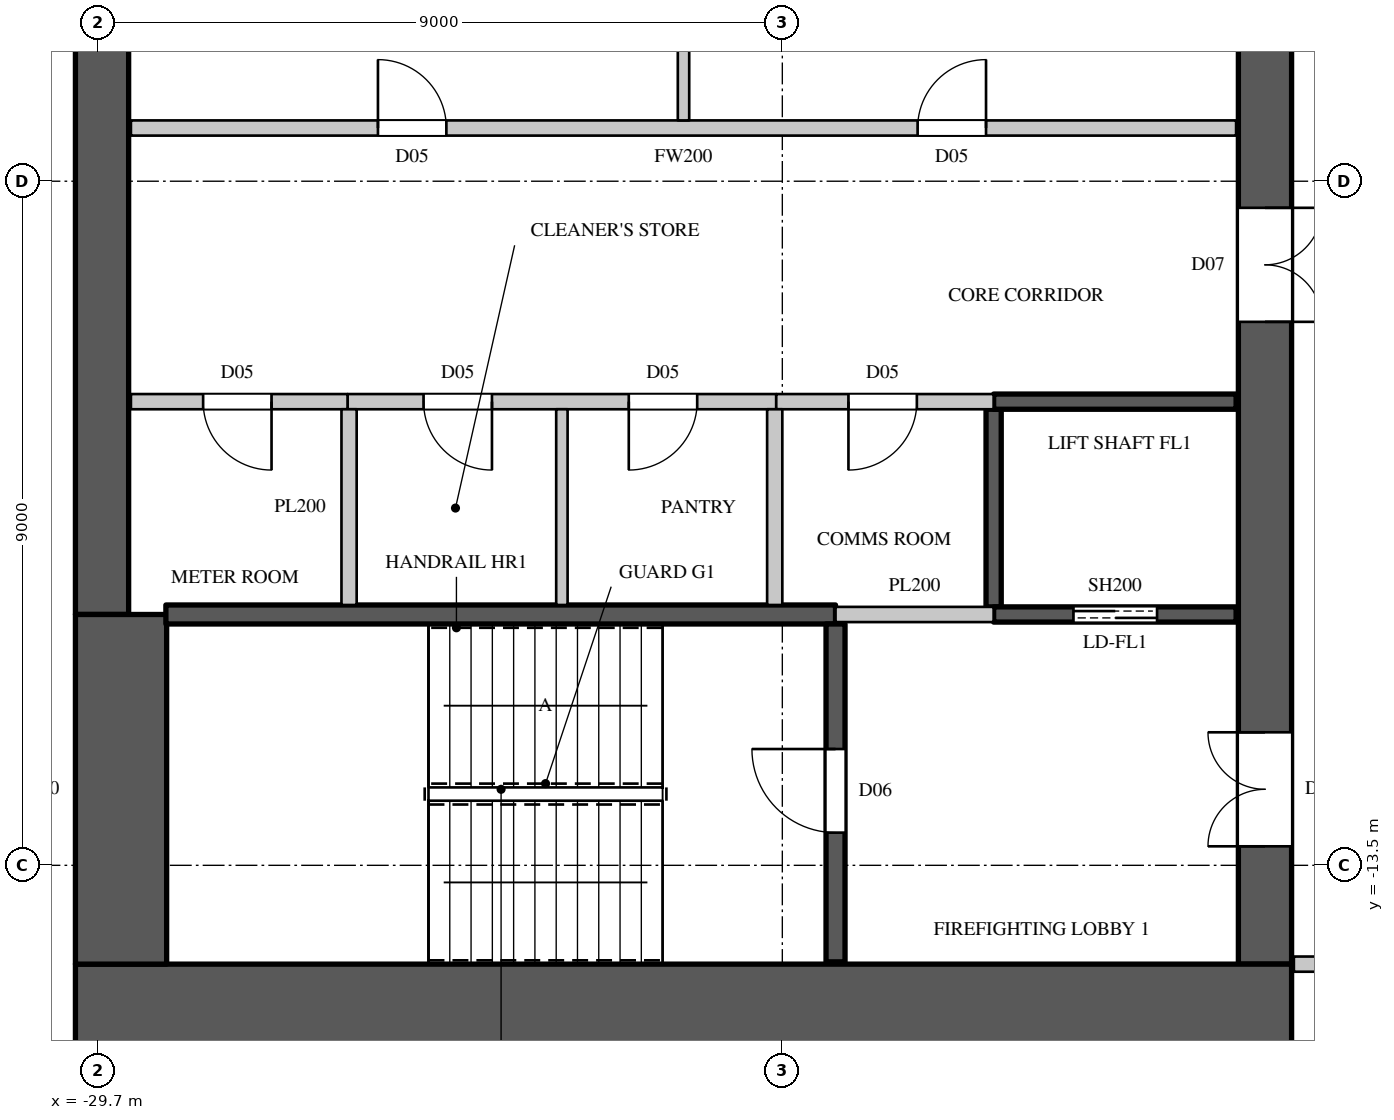
"""IFC4 building model, lengths in metres.
Left out: names, types, materials, properties, quantities, classifications, styles, units other than length and angle.
Written with IfcOpenShell. Run it as: python <this file> out.ifc"""

import sys

from ifc_helpers import new_model, si_unit, direction, frame, frame_2d, origin, place, context, subcontext, project, spatial, rectangle, extrude, element, fill, save


model = new_model("IFC4")
c1 = context("Model", 3, precision=1e-05, world=origin(), true_north=direction((0.0, 1.0)))
c2 = subcontext(c1, "Body", "Model", "MODEL_VIEW")
j1 = project(units=[si_unit("LENGTHUNIT", "METRE"), si_unit("PLANEANGLEUNIT", "RADIAN")], contexts=[c1])
p1 = place(None, origin())
s1 = spatial("IfcSite", under=j1, at=p1, CompositionType="ELEMENT")
p2 = place(p1, origin())
s2 = spatial("IfcBuilding", under=s1, at=p2, CompositionType="ELEMENT")
p3 = place(p2, frame((0.0, 0.0, 300.8)))
s3 = spatial("IfcBuildingStorey", under=s2, at=p3, CompositionType="ELEMENT", Elevation=300.8)
p4 = place(p3, frame((-30.0, -15.4, 0.0), z_axis=(0.0, 0.0, 1.0), x_axis=(1.0, 0.0, 0.0)))
e1 = element("IfcWall", 1, at=p4, inside=s3, PredefinedType="SHEAR", context=c2, shape_type="SweptSolid", body=[
    extrude(rectangle(XDim=16.0, YDim=1.2, at=frame_2d((8.0, 0.0))), origin(), (0.0, 0.0, 1.0), 4.1),
])
p5 = place(p3, frame((-14.35, -14.8, 0.0), z_axis=(0.0, 0.0, 1.0), x_axis=(0.0, 1.0, 0.0)))
e2 = element("IfcWall", 2, at=p5, inside=s3, PredefinedType="SHEAR", context=c2, shape_type="SweptSolid", body=[
    extrude(rectangle(XDim=29.6, YDim=0.7, at=frame_2d((14.8, 0.0))), origin(), (0.0, 0.0, 1.0), 4.1),
])
p6 = place(p5, frame((1.55, 0.0, 0.0)))
e3 = element("IfcOpeningElement", 3, at=p6, cuts=e2, PredefinedType="OPENING", context=c2, shape_type="SweptSolid", body=[
    extrude(rectangle(XDim=1.5, YDim=2.4, at=frame_2d((0.75, 1.2))), frame((0.0, 0.36, 0.0), z_axis=(0.0, -1.0, 0.0), x_axis=(1.0, 0.0, 0.0)), (0.0, 0.0, 1.0), 0.72),
])
p7 = place(p5, frame((26.55, 0.0, 0.0)))
e4 = element("IfcOpeningElement", 4, at=p7, cuts=e2, PredefinedType="OPENING", context=c2, shape_type="SweptSolid", body=[
    extrude(rectangle(XDim=1.5, YDim=2.4, at=frame_2d((0.75, 1.2))), frame((0.0, 0.36, 0.0), z_axis=(0.0, -1.0, 0.0), x_axis=(1.0, 0.0, 0.0)), (0.0, 0.0, 1.0), 0.72),
])
p8 = place(p5, frame((8.45, 0.0, 0.0)))
e5 = element("IfcOpeningElement", 5, at=p8, cuts=e2, PredefinedType="OPENING", context=c2, shape_type="SweptSolid", body=[
    extrude(rectangle(XDim=1.5, YDim=2.4, at=frame_2d((0.75, 1.2))), frame((0.0, 0.36, 0.0), z_axis=(0.0, -1.0, 0.0), x_axis=(1.0, 0.0, 0.0)), (0.0, 0.0, 1.0), 0.72),
])
p9 = place(p5, frame((19.65, 0.0, 0.0)))
e6 = element("IfcOpeningElement", 6, at=p9, cuts=e2, PredefinedType="OPENING", context=c2, shape_type="SweptSolid", body=[
    extrude(rectangle(XDim=1.5, YDim=2.4, at=frame_2d((0.75, 1.2))), frame((0.0, 0.36, 0.0), z_axis=(0.0, -1.0, 0.0), x_axis=(1.0, 0.0, 0.0)), (0.0, 0.0, 1.0), 0.72),
])
p10 = place(p5, frame((14.5, 0.0, 0.0)))
e7 = element("IfcOpeningElement", 7, at=p10, cuts=e2, PredefinedType="OPENING", context=c2, shape_type="SweptSolid", body=[
    extrude(rectangle(XDim=0.6, YDim=2.0, at=frame_2d((0.3, 1.0))), frame((0.0, 0.36, 0.0), z_axis=(0.0, -1.0, 0.0), x_axis=(1.0, 0.0, 0.0)), (0.0, 0.0, 1.0), 0.72),
])
p11 = place(p3, frame((-29.65, -10.2, 0.0), z_axis=(0.0, 0.0, 1.0), x_axis=(0.0, 1.0, 0.0)))
e8 = element("IfcWall", 8, at=p11, inside=s3, PredefinedType="SHEAR", context=c2, shape_type="SweptSolid", body=[
    extrude(rectangle(XDim=20.4, YDim=0.7, at=frame_2d((10.2, 0.0))), origin(), (0.0, 0.0, 1.0), 4.1),
])
p12 = place(p3, frame((-29.4, -14.8, 0.0), z_axis=(0.0, 0.0, 1.0), x_axis=(0.0, 1.0, 0.0)))
e9 = element("IfcWall", 9, at=p12, inside=s3, PredefinedType="SHEAR", context=c2, shape_type="SweptSolid", body=[
    extrude(rectangle(XDim=4.6, YDim=1.2, at=frame_2d((2.3, 0.0))), origin(), (0.0, 0.0, 1.0), 4.1),
])
p13 = place(p3, frame((-29.27, -3.8, 0.0), z_axis=(0.0, 0.0, 1.0), x_axis=(1.0, 0.0, 0.0)))
e10 = element("IfcWall", 10, at=p13, inside=s3, PredefinedType="PARTITIONING", context=c2, shape_type="SweptSolid", body=[
    extrude(rectangle(XDim=14.54, YDim=0.2, at=frame_2d((7.27, 0.0))), origin(), (0.0, 0.0, 1.0), 3.8),
])
p14 = place(p13, frame((3.25, 0.0, 0.0)))
e11 = element("IfcOpeningElement", 11, at=p14, cuts=e10, PredefinedType="OPENING", context=c2, shape_type="SweptSolid", body=[
    extrude(rectangle(XDim=0.9, YDim=2.2, at=frame_2d((0.45, 1.1))), frame((0.0, 0.11, 0.0), z_axis=(0.0, -1.0, 0.0), x_axis=(1.0, 0.0, 0.0)), (0.0, 0.0, 1.0), 0.22),
])
p15 = place(p13, frame((10.35, 0.0, 0.0)))
e12 = element("IfcOpeningElement", 12, at=p15, cuts=e10, PredefinedType="OPENING", context=c2, shape_type="SweptSolid", body=[
    extrude(rectangle(XDim=0.9, YDim=2.2, at=frame_2d((0.45, 1.1))), frame((0.0, 0.11, 0.0), z_axis=(0.0, -1.0, 0.0), x_axis=(1.0, 0.0, 0.0)), (0.0, 0.0, 1.0), 0.22),
])
p16 = place(p3, frame((-26.42, -7.4, 0.0), z_axis=(0.0, 0.0, 1.0), x_axis=(1.0, 0.0, 0.0)))
e13 = element("IfcWall", 13, at=p16, inside=s3, PredefinedType="PARTITIONING", context=c2, shape_type="SweptSolid", body=[
    extrude(rectangle(XDim=5.64, YDim=0.2, at=frame_2d((2.82, 0.0))), origin(), (0.0, 0.0, 1.0), 3.8),
])
p17 = place(p16, frame((1.0, 0.0, 0.0)))
e14 = element("IfcOpeningElement", 14, at=p17, cuts=e13, PredefinedType="OPENING", context=c2, shape_type="SweptSolid", body=[
    extrude(rectangle(XDim=0.9, YDim=2.2, at=frame_2d((0.45, 1.1))), frame((0.0, 0.11, 0.0), z_axis=(0.0, -1.0, 0.0), x_axis=(1.0, 0.0, 0.0)), (0.0, 0.0, 1.0), 0.22),
])
p18 = place(p16, frame((3.7, 0.0, 0.0)))
e15 = element("IfcOpeningElement", 15, at=p18, cuts=e13, PredefinedType="OPENING", context=c2, shape_type="SweptSolid", body=[
    extrude(rectangle(XDim=0.9, YDim=2.2, at=frame_2d((0.45, 1.1))), frame((0.0, 0.11, 0.0), z_axis=(0.0, -1.0, 0.0), x_axis=(1.0, 0.0, 0.0)), (0.0, 0.0, 1.0), 0.22),
])
p19 = place(p3, frame((-13.97, -14.8, 0.0), z_axis=(0.0, 0.0, 1.0), x_axis=(1.0, 0.0, 0.0)))
e16 = element("IfcWall", 16, at=p19, inside=s3, PredefinedType="PARTITIONING", context=c2, shape_type="SweptSolid", body=[
    extrude(rectangle(XDim=2.87, YDim=0.2, at=frame_2d((1.435, 0.0))), origin(), (0.0, 0.0, 1.0), 3.8),
])
p20 = place(p3, frame((-23.6, -10.075, 0.0), z_axis=(0.0, 0.0, 1.0), x_axis=(0.0, 1.0, 0.0)))
e17 = element("IfcWall", 17, at=p20, inside=s3, PredefinedType="PARTITIONING", context=c2, shape_type="SweptSolid", body=[
    extrude(rectangle(XDim=2.575, YDim=0.15, at=frame_2d((1.288, 0.0))), origin(), (0.0, 0.0, 1.0), 3.8),
])
p21 = place(p3, frame((-22.0, -3.7, 0.0), z_axis=(0.0, 0.0, 1.0), x_axis=(0.0, 1.0, 0.0)))
e18 = element("IfcWall", 18, at=p21, inside=s3, PredefinedType="PARTITIONING", context=c2, shape_type="SweptSolid", body=[
    extrude(rectangle(XDim=2.6, YDim=0.15, at=frame_2d((1.3, 0.0))), origin(), (0.0, 0.0, 1.0), 3.8),
])
p22 = place(p3, frame((-29.27, -7.4, 0.0), z_axis=(0.0, 0.0, 1.0), x_axis=(1.0, 0.0, 0.0)))
e19 = element("IfcWall", 19, at=p22, inside=s3, PredefinedType="PARTITIONING", context=c2, shape_type="SweptSolid", body=[
    extrude(rectangle(XDim=2.85, YDim=0.2, at=frame_2d((1.425, 0.0))), origin(), (0.0, 0.0, 1.0), 3.8),
])
p23 = place(p22, frame((0.95, 0.0, 0.0)))
e20 = element("IfcOpeningElement", 20, at=p23, cuts=e19, PredefinedType="OPENING", context=c2, shape_type="SweptSolid", body=[
    extrude(rectangle(XDim=0.9, YDim=2.2, at=frame_2d((0.45, 1.1))), frame((0.0, 0.11, 0.0), z_axis=(0.0, -1.0, 0.0), x_axis=(1.0, 0.0, 0.0)), (0.0, 0.0, 1.0), 0.22),
])
p24 = place(p3, frame((-26.4, -10.075, 0.0), z_axis=(0.0, 0.0, 1.0), x_axis=(0.0, 1.0, 0.0)))
e21 = element("IfcWall", 21, at=p24, inside=s3, PredefinedType="PARTITIONING", context=c2, shape_type="SweptSolid", body=[
    extrude(rectangle(XDim=2.575, YDim=0.2, at=frame_2d((1.288, 0.0))), origin(), (0.0, 0.0, 1.0), 3.8),
])
p25 = place(p3, frame((-20.78, -7.4, 0.0), z_axis=(0.0, 0.0, 1.0), x_axis=(1.0, 0.0, 0.0)))
e22 = element("IfcWall", 22, at=p25, inside=s3, PredefinedType="PARTITIONING", context=c2, shape_type="SweptSolid", body=[
    extrude(rectangle(XDim=2.86, YDim=0.2, at=frame_2d((1.43, 0.0))), origin(), (0.0, 0.0, 1.0), 3.8),
])
p26 = place(p25, frame((0.95, 0.0, 0.0)))
e23 = element("IfcOpeningElement", 23, at=p26, cuts=e22, PredefinedType="OPENING", context=c2, shape_type="SweptSolid", body=[
    extrude(rectangle(XDim=0.9, YDim=2.2, at=frame_2d((0.45, 1.1))), frame((0.0, 0.11, 0.0), z_axis=(0.0, -1.0, 0.0), x_axis=(1.0, 0.0, 0.0)), (0.0, 0.0, 1.0), 0.22),
])
p27 = place(p3, frame((-20.8, -10.075, 0.0), z_axis=(0.0, 0.0, 1.0), x_axis=(0.0, 1.0, 0.0)))
e24 = element("IfcWall", 24, at=p27, inside=s3, PredefinedType="PARTITIONING", context=c2, shape_type="SweptSolid", body=[
    extrude(rectangle(XDim=2.575, YDim=0.2, at=frame_2d((1.288, 0.0))), origin(), (0.0, 0.0, 1.0), 3.8),
])
p28 = place(p3, frame((-20.0, -10.2, 0.0), z_axis=(0.0, 0.0, 1.0), x_axis=(1.0, 0.0, 0.0)))
e25 = element("IfcWall", 25, at=p28, inside=s3, PredefinedType="PARTITIONING", context=c2, shape_type="SweptSolid", body=[
    extrude(rectangle(XDim=2.08, YDim=0.2, at=frame_2d((1.04, 0.0))), origin(), (0.0, 0.0, 1.0), 3.8),
])
p29 = place(p3, frame((-17.92, -10.1, 0.0), z_axis=(0.0, 0.0, 1.0), x_axis=(0.0, 1.0, 0.0)))
e26 = element("IfcWall", 26, at=p29, inside=s3, PredefinedType="SHEAR", context=c2, shape_type="SweptSolid", body=[
    extrude(rectangle(XDim=2.6, YDim=0.2, at=frame_2d((1.3, 0.0))), origin(), (0.0, 0.0, 1.0), 3.8),
])
p30 = place(p3, frame((-17.92, -10.2, 0.0), z_axis=(0.0, 0.0, 1.0), x_axis=(1.0, 0.0, 0.0)))
e27 = element("IfcWall", 27, at=p30, inside=s3, PredefinedType="SHEAR", context=c2, shape_type="SweptSolid", body=[
    extrude(rectangle(XDim=3.19, YDim=0.2, at=frame_2d((1.595, 0.0))), origin(), (0.0, 0.0, 1.0), 3.8),
])
p31 = place(p30, frame((1.05, 0.0, 0.0)))
e28 = element("IfcOpeningElement", 28, at=p31, cuts=e27, PredefinedType="OPENING", context=c2, shape_type="SweptSolid", body=[
    extrude(rectangle(XDim=1.1, YDim=2.2, at=frame_2d((0.55, 1.1))), frame((0.0, 0.11, 0.0), z_axis=(0.0, -1.0, 0.0), x_axis=(1.0, 0.0, 0.0)), (0.0, 0.0, 1.0), 0.22),
])
p32 = place(p3, frame((-17.92, -7.4, 0.0), z_axis=(0.0, 0.0, 1.0), x_axis=(1.0, 0.0, 0.0)))
e29 = element("IfcWall", 29, at=p32, inside=s3, PredefinedType="SHEAR", context=c2, shape_type="SweptSolid", body=[
    extrude(rectangle(XDim=3.19, YDim=0.2, at=frame_2d((1.595, 0.0))), origin(), (0.0, 0.0, 1.0), 3.8),
])
p33 = place(p3, frame((-28.81, -10.2, 0.0), z_axis=(0.0, 0.0, 1.0), x_axis=(1.0, 0.0, 0.0)))
e30 = element("IfcWall", 30, at=p33, inside=s3, PredefinedType="SHEAR", context=c2, shape_type="SweptSolid", body=[
    extrude(rectangle(XDim=8.81, YDim=0.25, at=frame_2d((4.405, 0.0))), origin(), (0.0, 0.0, 1.0), 3.8),
])
p34 = place(p3, frame((-20.0, -14.77, 0.0), z_axis=(0.0, 0.0, 1.0), x_axis=(0.0, 1.0, 0.0)))
e31 = element("IfcWall", 31, at=p34, inside=s3, PredefinedType="SHEAR", context=c2, shape_type="SweptSolid", body=[
    extrude(rectangle(XDim=4.445, YDim=0.25, at=frame_2d((2.223, 0.0))), origin(), (0.0, 0.0, 1.0), 3.8),
])
p35 = place(p34, frame((1.7, 0.0, 0.0)))
e32 = element("IfcOpeningElement", 32, at=p35, cuts=e31, PredefinedType="OPENING", context=c2, shape_type="SweptSolid", body=[
    extrude(rectangle(XDim=1.1, YDim=2.2, at=frame_2d((0.55, 1.1))), frame((0.0, 0.135, 0.0), z_axis=(0.0, -1.0, 0.0), x_axis=(1.0, 0.0, 0.0)), (0.0, 0.0, 1.0), 0.27),
])
p36 = place(p35, origin())
e33 = element("IfcDoor", 33, at=p36, inside=s3, OperationType="SINGLE_SWING_RIGHT", PredefinedType="DOOR", context=c2, shape_type="SweptSolid", body=[
    extrude(rectangle(XDim=1.1, YDim=2.2, at=frame_2d((0.55, 1.1))), frame((0.0, 0.025, 0.0), z_axis=(0.0, -1.0, 0.0), x_axis=(1.0, 0.0, 0.0)), (0.0, 0.0, 1.0), 0.05),
])
fill(e32, e33)
p37 = place(p23, origin())
e34 = element("IfcDoor", 34, at=p37, inside=s3, OperationType="SINGLE_SWING_LEFT", PredefinedType="DOOR", context=c2, shape_type="SweptSolid", body=[
    extrude(rectangle(XDim=0.9, YDim=2.2, at=frame_2d((0.45, 1.1))), frame((0.0, 0.025, 0.0), z_axis=(0.0, -1.0, 0.0), x_axis=(1.0, 0.0, 0.0)), (0.0, 0.0, 1.0), 0.05),
])
fill(e20, e34)
p38 = place(p17, origin())
e35 = element("IfcDoor", 35, at=p38, inside=s3, OperationType="SINGLE_SWING_LEFT", PredefinedType="DOOR", context=c2, shape_type="SweptSolid", body=[
    extrude(rectangle(XDim=0.9, YDim=2.2, at=frame_2d((0.45, 1.1))), frame((0.0, 0.025, 0.0), z_axis=(0.0, -1.0, 0.0), x_axis=(1.0, 0.0, 0.0)), (0.0, 0.0, 1.0), 0.05),
])
fill(e14, e35)
p39 = place(p18, origin())
e36 = element("IfcDoor", 36, at=p39, inside=s3, OperationType="SINGLE_SWING_RIGHT", PredefinedType="DOOR", context=c2, shape_type="SweptSolid", body=[
    extrude(rectangle(XDim=0.9, YDim=2.2, at=frame_2d((0.45, 1.1))), frame((0.0, 0.025, 0.0), z_axis=(0.0, -1.0, 0.0), x_axis=(1.0, 0.0, 0.0)), (0.0, 0.0, 1.0), 0.05),
])
fill(e15, e36)
p40 = place(p26, origin())
e37 = element("IfcDoor", 37, at=p40, inside=s3, OperationType="SINGLE_SWING_RIGHT", PredefinedType="DOOR", context=c2, shape_type="SweptSolid", body=[
    extrude(rectangle(XDim=0.9, YDim=2.2, at=frame_2d((0.45, 1.1))), frame((0.0, 0.025, 0.0), z_axis=(0.0, -1.0, 0.0), x_axis=(1.0, 0.0, 0.0)), (0.0, 0.0, 1.0), 0.05),
])
fill(e23, e37)
p41 = place(p14, origin())
e38 = element("IfcDoor", 38, at=p41, inside=s3, OperationType="SINGLE_SWING_LEFT", PredefinedType="DOOR", context=c2, shape_type="SweptSolid", body=[
    extrude(rectangle(XDim=0.9, YDim=2.2, at=frame_2d((0.45, 1.1))), frame((0.0, 0.025, 0.0), z_axis=(0.0, -1.0, 0.0), x_axis=(1.0, 0.0, 0.0)), (0.0, 0.0, 1.0), 0.05),
])
fill(e11, e38)
p42 = place(p15, origin())
e39 = element("IfcDoor", 39, at=p42, inside=s3, OperationType="SINGLE_SWING_RIGHT", PredefinedType="DOOR", context=c2, shape_type="SweptSolid", body=[
    extrude(rectangle(XDim=0.9, YDim=2.2, at=frame_2d((0.45, 1.1))), frame((0.0, 0.025, 0.0), z_axis=(0.0, -1.0, 0.0), x_axis=(1.0, 0.0, 0.0)), (0.0, 0.0, 1.0), 0.05),
])
fill(e12, e39)
p43 = place(p31, origin())
e40 = element("IfcDoor", 40, at=p43, inside=s3, OperationType="DOUBLE_DOOR_SLIDING", PredefinedType="DOOR", context=c2, shape_type="SweptSolid", body=[
    extrude(rectangle(XDim=1.1, YDim=2.2, at=frame_2d((0.55, 1.1))), frame((0.0, 0.025, 0.0), z_axis=(0.0, -1.0, 0.0), x_axis=(1.0, 0.0, 0.0)), (0.0, 0.0, 1.0), 0.05),
])
fill(e28, e40)
p44 = place(p6, origin())
e41 = element("IfcDoor", 41, at=p44, inside=s3, OperationType="DOUBLE_DOOR_SINGLE_SWING", PredefinedType="DOOR", context=c2, shape_type="SweptSolid", body=[
    extrude(rectangle(XDim=1.5, YDim=2.4, at=frame_2d((0.75, 1.2))), frame((0.0, 0.345, 0.0), z_axis=(0.0, -1.0, 0.0), x_axis=(1.0, 0.0, 0.0)), (0.0, 0.0, 1.0), 0.05),
])
fill(e3, e41)
p45 = place(p8, origin())
e42 = element("IfcDoor", 42, at=p45, inside=s3, OperationType="DOUBLE_DOOR_SINGLE_SWING", PredefinedType="DOOR", context=c2, shape_type="SweptSolid", body=[
    extrude(rectangle(XDim=1.5, YDim=2.4, at=frame_2d((0.75, 1.2))), frame((0.0, -0.295, 0.0), z_axis=(0.0, -1.0, 0.0), x_axis=(1.0, 0.0, 0.0)), (0.0, 0.0, 1.0), 0.05),
])
fill(e5, e42)
save(model, sys.argv[1])
